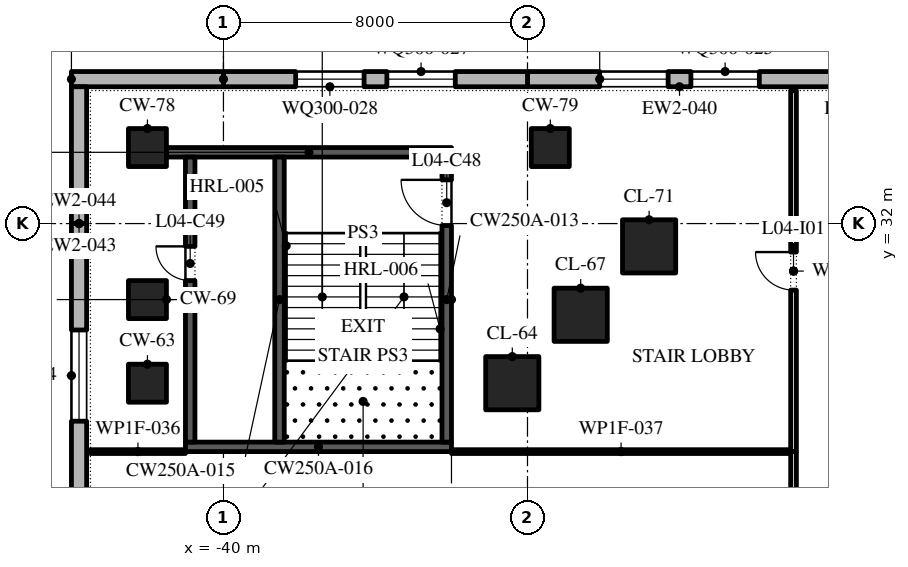
"""IFC4 building model, lengths in metres.
Left out: names, types, materials, properties, quantities, classifications, styles, units other than length and angle.
Written with IfcOpenShell. Run it as: python <this file> out.ifc"""

import sys

from ifc_helpers import new_model, si_unit, direction, frame, frame_2d, origin, origin_2d, place, context, subcontext, project, spatial, polyline, rectangle, outline, extrude, element, fill, save


model = new_model("IFC4")
c1 = context("Model", 3, precision=1e-05, world=origin(), true_north=direction((0.0, 1.0)))
c2 = subcontext(c1, "Body", "Model", "MODEL_VIEW")
j1 = project(units=[si_unit("LENGTHUNIT", "METRE"), si_unit("PLANEANGLEUNIT", "RADIAN")], contexts=[c1])
p1 = place(None, origin())
s1 = spatial("IfcSite", under=j1, at=p1, CompositionType="ELEMENT")
p2 = place(p1, origin())
s2 = spatial("IfcBuilding", under=s1, at=p2, CompositionType="ELEMENT")
p3 = place(p2, frame((0.0, 0.0, 24.0)))
s3 = spatial("IfcBuildingStorey", under=s2, at=p3, CompositionType="ELEMENT", Elevation=24.0)
p4 = place(p3, frame((-42.0, 27.8, 0.0), z_axis=(0.0, 0.0, 1.0), x_axis=(1.0, 0.0, 0.0)))
e1 = element("IfcColumn", 1, at=p4, inside=s3, PredefinedType="COLUMN", context=c2, shape_type="SweptSolid", body=[
    extrude(rectangle(XDim=1.0, YDim=1.0, at=origin_2d()), origin(), (0.0, 0.0, 1.0), 4.8),
])
for number, where, z_axis, x_axis in (
    (2, (-32.4, 27.8, 0.0), (0.0, 0.0, 1.0), (1.0, 0.0, 0.0)),
    (3, (-30.6, 29.6, 0.0), (0.0, 0.0, 1.0), (1.0, 0.0, 0.0)),
):
    element("IfcColumn", number, at=place(p3, frame(where, z_axis=z_axis, x_axis=x_axis)), inside=s3, PredefinedType="COLUMN", context=c2, shape_type="SweptSolid", body=[
        extrude(rectangle(XDim=1.4, YDim=1.4, at=origin_2d()), origin(), (0.0, 0.0, 1.0), 4.8),
    ])
p5 = place(p3, frame((-42.0, 30.0, 0.0), z_axis=(0.0, 0.0, 1.0), x_axis=(1.0, 0.0, 0.0)))
e4 = element("IfcColumn", 4, at=p5, inside=s3, PredefinedType="COLUMN", context=c2, shape_type="SweptSolid", body=[
    extrude(rectangle(XDim=1.0, YDim=1.0, at=origin_2d()), origin(), (0.0, 0.0, 1.0), 4.8),
])
p6 = place(p3, frame((-28.8, 31.4, 0.0), z_axis=(0.0, 0.0, 1.0), x_axis=(1.0, 0.0, 0.0)))
e5 = element("IfcColumn", 5, at=p6, inside=s3, PredefinedType="COLUMN", context=c2, shape_type="SweptSolid", body=[
    extrude(rectangle(XDim=1.4, YDim=1.4, at=origin_2d()), origin(), (0.0, 0.0, 1.0), 4.8),
])
for number, where, z_axis, x_axis in (
    (6, (-42.0, 34.0, 0.0), (0.0, 0.0, 1.0), (1.0, 0.0, 0.0)),
    (7, (-31.4, 34.0, 0.0), (0.0, 0.0, 1.0), (1.0, 0.0, 0.0)),
):
    element("IfcColumn", number, at=place(p3, frame(where, z_axis=z_axis, x_axis=x_axis)), inside=s3, PredefinedType="COLUMN", context=c2, shape_type="SweptSolid", body=[
        extrude(rectangle(XDim=1.0, YDim=1.0, at=origin_2d()), origin(), (0.0, 0.0, 1.0), 4.8),
    ])
p7 = place(p3, frame((-24.0, 35.8, 0.0), z_axis=(0.0, 0.0, 1.0), x_axis=(-1.0, 0.0, 0.0)))
e8 = element("IfcWall", 8, at=p7, inside=s3, PredefinedType="STANDARD", context=c2, shape_type="SweptSolid", body=[
    extrude(rectangle(XDim=8.0, YDim=0.4, at=frame_2d((4.0, 0.0))), origin(), (0.0, 0.0, 1.0), 4.5),
])
p8 = place(p7, frame((1.9, 0.0, 0.9)))
e9 = element("IfcOpeningElement", 9, at=p8, cuts=e8, PredefinedType="OPENING", context=c2, shape_type="SweptSolid", body=[
    extrude(outline(polyline([(0.0, 0.0), (1.8, 0.0), (1.8, 1.5), (1.785, 1.729), (1.738, 1.954), (1.662, 2.17), (1.558, 2.375), (1.427, 2.563), (1.271, 2.732), (1.095, 2.879), (0.9, 3.0), (0.705, 2.879), (0.529, 2.732), (0.373, 2.563), (0.242, 2.375), (0.138, 2.17), (0.062, 1.954), (0.015, 1.729), (0.0, 1.5), (0.0, 0.0)])), frame((0.0, 0.21, 0.0), z_axis=(0.0, -1.0, 0.0), x_axis=(1.0, 0.0, 0.0)), (0.0, 0.0, 1.0), 0.42),
])
p9 = place(p7, frame((4.3, 0.0, 0.9)))
e10 = element("IfcOpeningElement", 10, at=p9, cuts=e8, PredefinedType="OPENING", context=c2, shape_type="SweptSolid", body=[
    extrude(outline(polyline([(0.0, 0.0), (1.8, 0.0), (1.8, 1.5), (1.785, 1.729), (1.738, 1.954), (1.662, 2.17), (1.558, 2.375), (1.427, 2.563), (1.271, 2.732), (1.095, 2.879), (0.9, 3.0), (0.705, 2.879), (0.529, 2.732), (0.373, 2.563), (0.242, 2.375), (0.138, 2.17), (0.062, 1.954), (0.015, 1.729), (0.0, 1.5), (0.0, 0.0)])), frame((0.0, 0.21, 0.0), z_axis=(0.0, -1.0, 0.0), x_axis=(1.0, 0.0, 0.0)), (0.0, 0.0, 1.0), 0.42),
])
p10 = place(p3, frame((-32.0, 35.8, 0.0), z_axis=(0.0, 0.0, 1.0), x_axis=(-1.0, 0.0, 0.0)))
e11 = element("IfcWall", 11, at=p10, inside=s3, PredefinedType="STANDARD", context=c2, shape_type="SweptSolid", body=[
    extrude(rectangle(XDim=8.0, YDim=0.4, at=frame_2d((4.0, 0.0))), origin(), (0.0, 0.0, 1.0), 4.5),
])
p11 = place(p10, frame((1.9, 0.0, 0.9)))
e12 = element("IfcOpeningElement", 12, at=p11, cuts=e11, PredefinedType="OPENING", context=c2, shape_type="SweptSolid", body=[
    extrude(outline(polyline([(0.0, 0.0), (1.8, 0.0), (1.8, 1.5), (1.785, 1.729), (1.738, 1.954), (1.662, 2.17), (1.558, 2.375), (1.427, 2.563), (1.271, 2.732), (1.095, 2.879), (0.9, 3.0), (0.705, 2.879), (0.529, 2.732), (0.373, 2.563), (0.242, 2.375), (0.138, 2.17), (0.062, 1.954), (0.015, 1.729), (0.0, 1.5), (0.0, 0.0)])), frame((0.0, 0.21, 0.0), z_axis=(0.0, -1.0, 0.0), x_axis=(1.0, 0.0, 0.0)), (0.0, 0.0, 1.0), 0.42),
])
p12 = place(p10, frame((4.3, 0.0, 0.9)))
e13 = element("IfcOpeningElement", 13, at=p12, cuts=e11, PredefinedType="OPENING", context=c2, shape_type="SweptSolid", body=[
    extrude(outline(polyline([(0.0, 0.0), (1.8, 0.0), (1.8, 1.5), (1.785, 1.729), (1.738, 1.954), (1.662, 2.17), (1.558, 2.375), (1.427, 2.563), (1.271, 2.732), (1.095, 2.879), (0.9, 3.0), (0.705, 2.879), (0.529, 2.732), (0.373, 2.563), (0.242, 2.375), (0.138, 2.17), (0.062, 1.954), (0.015, 1.729), (0.0, 1.5), (0.0, 0.0)])), frame((0.0, 0.21, 0.0), z_axis=(0.0, -1.0, 0.0), x_axis=(1.0, 0.0, 0.0)), (0.0, 0.0, 1.0), 0.42),
])
p13 = place(p3, frame((-40.0, 35.8, 0.0), z_axis=(0.0, 0.0, 1.0), x_axis=(-1.0, 0.0, 0.0)))
e14 = element("IfcWall", 14, at=p13, inside=s3, PredefinedType="STANDARD", context=c2, shape_type="SweptSolid", body=[
    extrude(rectangle(XDim=4.0, YDim=0.4, at=frame_2d((2.0, 0.0))), origin(), (0.0, 0.0, 1.0), 4.5),
])
p14 = place(p3, frame((-43.8, 35.6, 0.0), z_axis=(0.0, 0.0, 1.0), x_axis=(0.0, -1.0, 0.0)))
e15 = element("IfcWall", 15, at=p14, inside=s3, PredefinedType="STANDARD", context=c2, shape_type="SweptSolid", body=[
    extrude(rectangle(XDim=3.6, YDim=0.4, at=frame_2d((1.8, 0.0))), origin(), (0.0, 0.0, 1.0), 4.5),
])
p15 = place(p3, frame((-43.8, 32.0, 0.0), z_axis=(0.0, 0.0, 1.0), x_axis=(0.0, -1.0, 0.0)))
e16 = element("IfcWall", 16, at=p15, inside=s3, PredefinedType="STANDARD", context=c2, shape_type="SweptSolid", body=[
    extrude(rectangle(XDim=8.0, YDim=0.4, at=frame_2d((4.0, 0.0))), origin(), (0.0, 0.0, 1.0), 4.5),
])
p16 = place(p15, frame((2.8, 0.0, 0.9)))
e17 = element("IfcOpeningElement", 17, at=p16, cuts=e16, PredefinedType="OPENING", context=c2, shape_type="SweptSolid", body=[
    extrude(outline(polyline([(0.0, 0.0), (2.4, 0.0), (2.4, 1.5), (2.378, 1.758), (2.313, 2.009), (2.207, 2.245), (2.063, 2.46), (1.885, 2.648), (1.677, 2.804), (1.447, 2.922), (1.2, 3.0), (0.953, 2.922), (0.722, 2.804), (0.515, 2.648), (0.337, 2.46), (0.193, 2.245), (0.087, 2.009), (0.022, 1.758), (0.0, 1.5), (0.0, 0.0)])), frame((0.0, 0.21, 0.0), z_axis=(0.0, -1.0, 0.0), x_axis=(1.0, 0.0, 0.0)), (0.0, 0.0, 1.0), 0.42),
])
p17 = place(p3, frame((-41.0, 26.125, 0.0), z_axis=(0.0, 0.0, 1.0), x_axis=(1.0, 0.0, 0.0)))
e18 = element("IfcWall", 18, at=p17, inside=s3, PredefinedType="SHEAR", context=c2, shape_type="SweptSolid", body=[
    extrude(rectangle(XDim=7.0, YDim=0.25, at=frame_2d((3.5, 0.0))), origin(), (0.0, 0.0, 1.0), 4.5),
])
p18 = place(p3, frame((-41.5, 33.875, 0.0), z_axis=(0.0, 0.0, 1.0), x_axis=(1.0, 0.0, 0.0)))
e19 = element("IfcWall", 19, at=p18, inside=s3, PredefinedType="SHEAR", context=c2, shape_type="SweptSolid", body=[
    extrude(rectangle(XDim=7.5, YDim=0.25, at=frame_2d((3.75, 0.0))), origin(), (0.0, 0.0, 1.0), 4.5),
])
p19 = place(p3, frame((-40.875, 26.25, 0.0), z_axis=(0.0, 0.0, 1.0), x_axis=(0.0, 1.0, 0.0)))
e20 = element("IfcWall", 20, at=p19, inside=s3, PredefinedType="SHEAR", context=c2, shape_type="SweptSolid", body=[
    extrude(rectangle(XDim=7.5, YDim=0.25, at=frame_2d((3.75, 0.0))), origin(), (0.0, 0.0, 1.0), 4.5),
])
p20 = place(p19, frame((4.25, 0.0, 0.0)))
e21 = element("IfcOpeningElement", 21, at=p20, cuts=e20, PredefinedType="OPENING", context=c2, shape_type="SweptSolid", body=[
    extrude(rectangle(XDim=0.9, YDim=2.1, at=frame_2d((0.45, 1.05))), frame((0.0, 0.135, 0.0), z_axis=(0.0, -1.0, 0.0), x_axis=(1.0, 0.0, 0.0)), (0.0, 0.0, 1.0), 0.27),
])
p21 = place(p3, frame((-34.125, 26.25, 0.0), z_axis=(0.0, 0.0, 1.0), x_axis=(0.0, 1.0, 0.0)))
e22 = element("IfcWall", 22, at=p21, inside=s3, PredefinedType="SHEAR", context=c2, shape_type="SweptSolid", body=[
    extrude(rectangle(XDim=7.5, YDim=0.25, at=frame_2d((3.75, 0.0))), origin(), (0.0, 0.0, 1.0), 4.5),
])
p22 = place(p21, frame((5.7, 0.0, 0.0)))
e23 = element("IfcOpeningElement", 23, at=p22, cuts=e22, PredefinedType="OPENING", context=c2, shape_type="SweptSolid", body=[
    extrude(rectangle(XDim=1.2, YDim=2.1, at=frame_2d((0.6, 1.05))), frame((0.0, 0.135, 0.0), z_axis=(0.0, -1.0, 0.0), x_axis=(1.0, 0.0, 0.0)), (0.0, 0.0, 1.0), 0.27),
])
p23 = place(p3, frame((-38.525, 26.25, 0.0), z_axis=(0.0, 0.0, 1.0), x_axis=(0.0, 1.0, 0.0)))
e24 = element("IfcWall", 24, at=p23, inside=s3, PredefinedType="SHEAR", context=c2, shape_type="SweptSolid", body=[
    extrude(rectangle(XDim=7.5, YDim=0.25, at=frame_2d((3.75, 0.0))), origin(), (0.0, 0.0, 1.0), 4.5),
])
p24 = place(p3, frame((-43.5, 26.0, 0.0), z_axis=(0.0, 0.0, 1.0), x_axis=(1.0, 0.0, 0.0)))
e25 = element("IfcWall", 25, at=p24, inside=s3, PredefinedType="PARTITIONING", context=c2, shape_type="SweptSolid", body=[
    extrude(rectangle(XDim=2.5, YDim=0.1, at=frame_2d((1.25, 0.0))), origin(), (0.0, 0.0, 1.0), 4.5),
])
p25 = place(p3, frame((-34.0, 26.0, 0.0), z_axis=(0.0, 0.0, 1.0), x_axis=(1.0, 0.0, 0.0)))
e26 = element("IfcWall", 26, at=p25, inside=s3, PredefinedType="PARTITIONING", context=c2, shape_type="SweptSolid", body=[
    extrude(rectangle(XDim=8.925, YDim=0.1, at=frame_2d((4.462, 0.0))), origin(), (0.0, 0.0, 1.0), 4.5),
])
p26 = place(p3, frame((-25.0, 14.5, 0.0), z_axis=(0.0, 0.0, 1.0), x_axis=(0.0, 1.0, 0.0)))
e27 = element("IfcWall", 27, at=p26, inside=s3, PredefinedType="PARTITIONING", context=c2, shape_type="SweptSolid", body=[
    extrude(rectangle(XDim=11.5, YDim=0.15, at=frame_2d((5.75, 0.0))), origin(), (0.0, 0.0, 1.0), 4.5),
])
p27 = place(p26, frame((4.85, 0.0, 0.0)))
e28 = element("IfcOpeningElement", 28, at=p27, cuts=e27, PredefinedType="OPENING", context=c2, shape_type="SweptSolid", body=[
    extrude(rectangle(XDim=1.8, YDim=2.1, at=frame_2d((0.9, 1.05))), frame((0.0, 0.085, 0.0), z_axis=(0.0, -1.0, 0.0), x_axis=(1.0, 0.0, 0.0)), (0.0, 0.0, 1.0), 0.17),
])
p28 = place(p3, frame((-25.0, 26.0, 0.0), z_axis=(0.0, 0.0, 1.0), x_axis=(0.0, 1.0, 0.0)))
e29 = element("IfcWall", 29, at=p28, inside=s3, PredefinedType="PARTITIONING", context=c2, shape_type="SweptSolid", body=[
    extrude(rectangle(XDim=9.5, YDim=0.15, at=frame_2d((4.75, 0.0))), origin(), (0.0, 0.0, 1.0), 4.5),
])
p29 = place(p28, frame((4.25, 0.0, 0.0)))
e30 = element("IfcOpeningElement", 30, at=p29, cuts=e29, PredefinedType="OPENING", context=c2, shape_type="SweptSolid", body=[
    extrude(rectangle(XDim=1.0, YDim=2.1, at=frame_2d((0.5, 1.05))), frame((0.0, 0.085, 0.0), z_axis=(0.0, -1.0, 0.0), x_axis=(1.0, 0.0, 0.0)), (0.0, 0.0, 1.0), 0.17),
])
p30 = place(p8, origin())
e31 = element("IfcWindow", 31, at=p30, inside=s3, PartitioningType="DOUBLE_PANEL_VERTICAL", PredefinedType="WINDOW", context=c2, shape_type="SweptSolid", body=[
    extrude(outline(polyline([(0.0, 0.0), (1.8, 0.0), (1.8, 1.5), (1.785, 1.729), (1.738, 1.954), (1.662, 2.17), (1.558, 2.375), (1.427, 2.563), (1.271, 2.732), (1.095, 2.879), (0.9, 3.0), (0.705, 2.879), (0.529, 2.732), (0.373, 2.563), (0.242, 2.375), (0.138, 2.17), (0.062, 1.954), (0.015, 1.729), (0.0, 1.5), (0.0, 0.0)])), frame((0.0, 0.03, 0.0), z_axis=(0.0, -1.0, 0.0), x_axis=(1.0, 0.0, 0.0)), (0.0, 0.0, 1.0), 0.06),
])
fill(e9, e31)
p31 = place(p9, origin())
e32 = element("IfcWindow", 32, at=p31, inside=s3, PartitioningType="DOUBLE_PANEL_VERTICAL", PredefinedType="WINDOW", context=c2, shape_type="SweptSolid", body=[
    extrude(outline(polyline([(0.0, 0.0), (1.8, 0.0), (1.8, 1.5), (1.785, 1.729), (1.738, 1.954), (1.662, 2.17), (1.558, 2.375), (1.427, 2.563), (1.271, 2.732), (1.095, 2.879), (0.9, 3.0), (0.705, 2.879), (0.529, 2.732), (0.373, 2.563), (0.242, 2.375), (0.138, 2.17), (0.062, 1.954), (0.015, 1.729), (0.0, 1.5), (0.0, 0.0)])), frame((0.0, 0.03, 0.0), z_axis=(0.0, -1.0, 0.0), x_axis=(1.0, 0.0, 0.0)), (0.0, 0.0, 1.0), 0.06),
])
fill(e10, e32)
p32 = place(p11, origin())
e33 = element("IfcWindow", 33, at=p32, inside=s3, PartitioningType="DOUBLE_PANEL_VERTICAL", PredefinedType="WINDOW", context=c2, shape_type="SweptSolid", body=[
    extrude(outline(polyline([(0.0, 0.0), (1.8, 0.0), (1.8, 1.5), (1.785, 1.729), (1.738, 1.954), (1.662, 2.17), (1.558, 2.375), (1.427, 2.563), (1.271, 2.732), (1.095, 2.879), (0.9, 3.0), (0.705, 2.879), (0.529, 2.732), (0.373, 2.563), (0.242, 2.375), (0.138, 2.17), (0.062, 1.954), (0.015, 1.729), (0.0, 1.5), (0.0, 0.0)])), frame((0.0, 0.03, 0.0), z_axis=(0.0, -1.0, 0.0), x_axis=(1.0, 0.0, 0.0)), (0.0, 0.0, 1.0), 0.06),
])
fill(e12, e33)
p33 = place(p12, origin())
e34 = element("IfcWindow", 34, at=p33, inside=s3, PartitioningType="DOUBLE_PANEL_VERTICAL", PredefinedType="WINDOW", context=c2, shape_type="SweptSolid", body=[
    extrude(outline(polyline([(0.0, 0.0), (1.8, 0.0), (1.8, 1.5), (1.785, 1.729), (1.738, 1.954), (1.662, 2.17), (1.558, 2.375), (1.427, 2.563), (1.271, 2.732), (1.095, 2.879), (0.9, 3.0), (0.705, 2.879), (0.529, 2.732), (0.373, 2.563), (0.242, 2.375), (0.138, 2.17), (0.062, 1.954), (0.015, 1.729), (0.0, 1.5), (0.0, 0.0)])), frame((0.0, 0.03, 0.0), z_axis=(0.0, -1.0, 0.0), x_axis=(1.0, 0.0, 0.0)), (0.0, 0.0, 1.0), 0.06),
])
fill(e13, e34)
p34 = place(p16, origin())
e35 = element("IfcWindow", 35, at=p34, inside=s3, PartitioningType="DOUBLE_PANEL_VERTICAL", PredefinedType="WINDOW", context=c2, shape_type="SweptSolid", body=[
    extrude(outline(polyline([(0.0, 0.0), (2.4, 0.0), (2.4, 1.5), (2.378, 1.758), (2.313, 2.009), (2.207, 2.245), (2.063, 2.46), (1.885, 2.648), (1.677, 2.804), (1.447, 2.922), (1.2, 3.0), (0.953, 2.922), (0.722, 2.804), (0.515, 2.648), (0.337, 2.46), (0.193, 2.245), (0.087, 2.009), (0.022, 1.758), (0.0, 1.5), (0.0, 0.0)])), frame((0.0, 0.03, 0.0), z_axis=(0.0, -1.0, 0.0), x_axis=(1.0, 0.0, 0.0)), (0.0, 0.0, 1.0), 0.06),
])
fill(e17, e35)
p35 = place(p22, origin())
e36 = element("IfcDoor", 36, at=p35, inside=s3, OperationType="SINGLE_SWING_LEFT", PredefinedType="DOOR", context=c2, shape_type="SweptSolid", body=[
    extrude(rectangle(XDim=1.2, YDim=2.1, at=frame_2d((0.6, 1.05))), frame((0.0, 0.025, 0.0), z_axis=(0.0, -1.0, 0.0), x_axis=(1.0, 0.0, 0.0)), (0.0, 0.0, 1.0), 0.05),
])
fill(e23, e36)
p36 = place(p20, origin())
e37 = element("IfcDoor", 37, at=p36, inside=s3, OperationType="SINGLE_SWING_LEFT", PredefinedType="DOOR", context=c2, shape_type="SweptSolid", body=[
    extrude(rectangle(XDim=0.9, YDim=2.1, at=frame_2d((0.45, 1.05))), frame((0.0, -0.075, 0.0), z_axis=(0.0, -1.0, 0.0), x_axis=(1.0, 0.0, 0.0)), (0.0, 0.0, 1.0), 0.05),
])
fill(e21, e37)
p37 = place(p29, origin())
e38 = element("IfcDoor", 38, at=p37, inside=s3, OperationType="SINGLE_SWING_LEFT", PredefinedType="DOOR", context=c2, shape_type="SweptSolid", body=[
    extrude(rectangle(XDim=1.0, YDim=2.1, at=frame_2d((0.5, 1.05))), frame((0.0, 0.025, 0.0), z_axis=(0.0, -1.0, 0.0), x_axis=(1.0, 0.0, 0.0)), (0.0, 0.0, 1.0), 0.05),
])
fill(e30, e38)
save(model, sys.argv[1])
